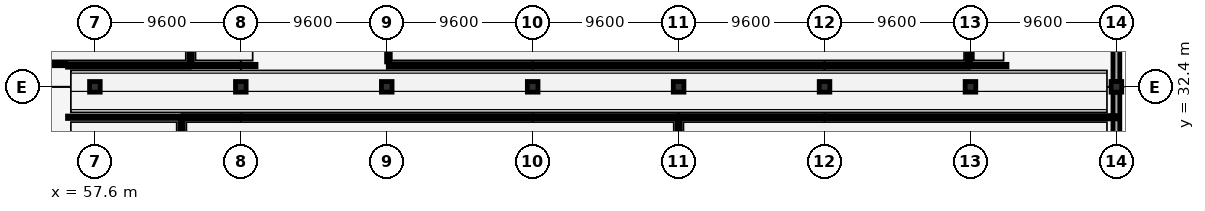
"""IFC4 building model, lengths in metres.
Left out: names, types, materials, properties, quantities, classifications, styles, units other than length and angle.
Written with IfcOpenShell. Run it as: python <this file> out.ifc"""

import sys

from ifc_helpers import new_model, si_unit, direction, frame, frame_2d, origin, origin_2d, place, context, subcontext, project, spatial, rectangle, extrude, element, fill, save


model = new_model("IFC4")
c1 = context("Model", 3, precision=1e-05, world=origin(), true_north=direction((0.0, 1.0)))
c2 = subcontext(c1, "Body", "Model", "MODEL_VIEW")
j1 = project(units=[si_unit("LENGTHUNIT", "METRE"), si_unit("PLANEANGLEUNIT", "RADIAN")], contexts=[c1])
p1 = place(None, origin())
s1 = spatial("IfcSite", under=j1, at=p1, CompositionType="ELEMENT")
p2 = place(p1, origin())
s2 = spatial("IfcBuilding", under=s1, at=p2, CompositionType="ELEMENT")
p3 = place(p2, frame((0.0, 0.0, -4.2)))
s3 = spatial("IfcBuildingStorey", under=s2, at=p3, CompositionType="ELEMENT", Elevation=-4.2)
for number, where, z_axis, x_axis in (
    (1, (57.6, 32.4, 0.0), (0.0, 0.0, 1.0), (1.0, 0.0, 0.0)),
    (2, (67.2, 32.4, 0.0), (0.0, 0.0, 1.0), (1.0, 0.0, 0.0)),
    (3, (76.8, 32.4, 0.0), (0.0, 0.0, 1.0), (1.0, 0.0, 0.0)),
    (4, (86.4, 32.4, 0.0), (0.0, 0.0, 1.0), (1.0, 0.0, 0.0)),
    (5, (96.0, 32.4, 0.0), (0.0, 0.0, 1.0), (1.0, 0.0, 0.0)),
    (6, (105.6, 32.4, 0.0), (0.0, 0.0, 1.0), (1.0, 0.0, 0.0)),
    (7, (115.2, 32.4, 0.0), (0.0, 0.0, 1.0), (1.0, 0.0, 0.0)),
    (8, (124.8, 32.4, 0.0), (0.0, 0.0, 1.0), (1.0, 0.0, 0.0)),
):
    element("IfcColumn", number, at=place(p3, frame(where, z_axis=z_axis, x_axis=x_axis)), inside=s3, PredefinedType="COLUMN", context=c2, shape_type="SweptSolid", body=[
        extrude(rectangle(XDim=0.7, YDim=0.7, at=origin_2d()), origin(), (0.0, 0.0, 1.0), 4.2),
    ])
for number, where, z_axis, x_axis in (
    (9, (124.8, 23.95, 0.0), (0.0, 0.0, 1.0), (0.0, 1.0, 0.0)),
    (10, (124.8, 32.75, 0.0), (0.0, 0.0, 1.0), (0.0, 1.0, 0.0)),
):
    element("IfcWall", number, at=place(p3, frame(where, z_axis=z_axis, x_axis=x_axis)), inside=s3, PredefinedType="SOLIDWALL", context=c2, shape_type="SweptSolid", body=[
        extrude(rectangle(XDim=8.1, YDim=0.45, at=frame_2d((4.05, 0.0))), origin(), (0.0, 0.0, 1.0), 3.84),
    ])
p4 = place(p3, frame((63.3, 18.155, 0.0), z_axis=(0.0, 0.0, 1.0), x_axis=(0.0, 1.0, 0.0)))
e11 = element("IfcWall", 11, at=p4, inside=s3, PredefinedType="PARTITIONING", context=c2, shape_type="SweptSolid", body=[
    extrude(rectangle(XDim=12.145, YDim=0.22, at=frame_2d((6.073, 0.0))), origin(), (0.0, 0.0, 1.0), 3.84),
])
p5 = place(p4, frame((5.323, 0.0, 0.0)))
e12 = element("IfcOpeningElement", 12, at=p5, cuts=e11, PredefinedType="OPENING", context=c2, shape_type="SweptSolid", body=[
    extrude(rectangle(XDim=1.5, YDim=2.2, at=frame_2d((0.75, 1.1))), frame((0.0, 0.12, 0.0), z_axis=(0.0, -1.0, 0.0), x_axis=(1.0, 0.0, 0.0)), (0.0, 0.0, 1.0), 0.24),
])
p6 = place(p3, frame((55.8, 30.4, 0.0), z_axis=(0.0, 0.0, 1.0), x_axis=(1.0, 0.0, 0.0)))
e13 = element("IfcWall", 13, at=p6, inside=s3, PredefinedType="PARTITIONING", context=c2, shape_type="SweptSolid", body=[
    extrude(rectangle(XDim=7.4, YDim=0.16, at=frame_2d((3.7, 0.0))), origin(), (0.0, 0.0, 1.0), 3.84),
])
p7 = place(p6, frame((3.044, 0.0, 0.0)))
e14 = element("IfcOpeningElement", 14, at=p7, cuts=e13, PredefinedType="OPENING", context=c2, shape_type="SweptSolid", body=[
    extrude(rectangle(XDim=1.8, YDim=2.15, at=frame_2d((0.9, 1.075))), frame((0.0, 0.09, 0.0), z_axis=(0.0, -1.0, 0.0), x_axis=(1.0, 0.0, 0.0)), (0.0, 0.0, 1.0), 0.18),
])
p8 = place(p3, frame((96.0, 11.4, 0.0), z_axis=(0.0, 0.0, 1.0), x_axis=(0.0, 1.0, 0.0)))
e15 = element("IfcWall", 15, at=p8, inside=s3, PredefinedType="PARTITIONING", context=c2, shape_type="SweptSolid", body=[
    extrude(rectangle(XDim=18.9, YDim=0.22, at=frame_2d((9.45, 0.0))), origin(), (0.0, 0.0, 1.0), 3.199),
])
p9 = place(p3, frame((63.4, 30.4, 0.0), z_axis=(0.0, 0.0, 1.0), x_axis=(1.0, 0.0, 0.0)))
e16 = element("IfcWall", 16, at=p9, inside=s3, PredefinedType="PARTITIONING", context=c2, shape_type="SweptSolid", body=[
    extrude(rectangle(XDim=32.55, YDim=0.22, at=frame_2d((16.275, 0.0))), origin(), (0.0, 0.0, 1.0), 3.84),
])
p10 = place(p9, frame((15.525, 0.0, 0.0)))
e17 = element("IfcOpeningElement", 17, at=p10, cuts=e16, PredefinedType="OPENING", context=c2, shape_type="SweptSolid", body=[
    extrude(rectangle(XDim=1.5, YDim=2.2, at=frame_2d((0.75, 1.1))), frame((0.0, 0.12, 0.0), z_axis=(0.0, -1.0, 0.0), x_axis=(1.0, 0.0, 0.0)), (0.0, 0.0, 1.0), 0.24),
])
p11 = place(p3, frame((96.03, 30.4, 0.0), z_axis=(0.0, 0.0, 1.0), x_axis=(1.0, 0.0, 0.0)))
e18 = element("IfcWall", 18, at=p11, inside=s3, PredefinedType="PARTITIONING", context=c2, shape_type="SweptSolid", body=[
    extrude(rectangle(XDim=28.72, YDim=0.22, at=frame_2d((14.36, 0.0))), origin(), (0.0, 0.0, 1.0), 3.84),
])
p12 = place(p11, frame((13.61, 0.0, 0.0)))
e19 = element("IfcOpeningElement", 19, at=p12, cuts=e18, PredefinedType="OPENING", context=c2, shape_type="SweptSolid", body=[
    extrude(rectangle(XDim=1.5, YDim=2.2, at=frame_2d((0.75, 1.1))), frame((0.0, 0.12, 0.0), z_axis=(0.0, -1.0, 0.0), x_axis=(1.0, 0.0, 0.0)), (0.0, 0.0, 1.0), 0.24),
])
p13 = place(p3, frame((115.15, 33.8, 0.0), z_axis=(0.0, 0.0, 1.0), x_axis=(1.0, 0.0, 0.0)))
e20 = element("IfcWall", 20, at=p13, inside=s3, PredefinedType="PARTITIONING", context=c2, shape_type="SweptSolid", body=[
    extrude(rectangle(XDim=2.45, YDim=0.16, at=frame_2d((1.225, 0.0))), origin(), (0.0, 0.0, 1.0), 3.84),
])
p14 = place(p13, frame((0.325, 0.0, 0.0)))
e21 = element("IfcOpeningElement", 21, at=p14, cuts=e20, PredefinedType="OPENING", context=c2, shape_type="SweptSolid", body=[
    extrude(rectangle(XDim=1.8, YDim=2.15, at=frame_2d((0.9, 1.075))), frame((0.0, 0.09, 0.0), z_axis=(0.0, -1.0, 0.0), x_axis=(1.0, 0.0, 0.0)), (0.0, 0.0, 1.0), 0.18),
])
p15 = place(p3, frame((64.0, 33.8, 0.0), z_axis=(0.0, 0.0, 1.0), x_axis=(1.0, 0.0, 0.0)))
e22 = element("IfcWall", 22, at=p15, inside=s3, PredefinedType="PARTITIONING", context=c2, shape_type="SweptSolid", body=[
    extrude(rectangle(XDim=4.2, YDim=0.16, at=frame_2d((2.1, 0.0))), origin(), (0.0, 0.0, 1.0), 3.84),
])
p16 = place(p15, frame((0.36, 0.0, 0.0)))
e23 = element("IfcOpeningElement", 23, at=p16, cuts=e22, PredefinedType="OPENING", context=c2, shape_type="SweptSolid", body=[
    extrude(rectangle(XDim=1.8, YDim=2.15, at=frame_2d((0.9, 1.075))), frame((0.0, 0.09, 0.0), z_axis=(0.0, -1.0, 0.0), x_axis=(1.0, 0.0, 0.0)), (0.0, 0.0, 1.0), 0.18),
])
p17 = place(p3, frame((55.8, 33.8, 0.0), z_axis=(0.0, 0.0, 1.0), x_axis=(1.0, 0.0, 0.0)))
e24 = element("IfcWall", 24, at=p17, inside=s3, PredefinedType="PARTITIONING", context=c2, shape_type="SweptSolid", body=[
    extrude(rectangle(XDim=8.0, YDim=0.22, at=frame_2d((4.0, 0.0))), origin(), (0.0, 0.0, 1.0), 3.84),
])
p18 = place(p17, frame((3.25, 0.0, 0.0)))
e25 = element("IfcOpeningElement", 25, at=p18, cuts=e24, PredefinedType="OPENING", context=c2, shape_type="SweptSolid", body=[
    extrude(rectangle(XDim=1.5, YDim=2.2, at=frame_2d((0.75, 1.1))), frame((0.0, 0.12, 0.0), z_axis=(0.0, -1.0, 0.0), x_axis=(1.0, 0.0, 0.0)), (0.0, 0.0, 1.0), 0.24),
])
p19 = place(p3, frame((76.9, 33.8, 0.0), z_axis=(0.0, 0.0, 1.0), x_axis=(1.0, 0.0, 0.0)))
e26 = element("IfcWall", 26, at=p19, inside=s3, PredefinedType="PARTITIONING", context=c2, shape_type="SweptSolid", body=[
    extrude(rectangle(XDim=38.17, YDim=0.22, at=frame_2d((19.085, 0.0))), origin(), (0.0, 0.0, 1.0), 3.84),
])
p20 = place(p19, frame((14.74, 0.0, 0.0)))
e27 = element("IfcOpeningElement", 27, at=p20, cuts=e26, PredefinedType="OPENING", context=c2, shape_type="SweptSolid", body=[
    extrude(rectangle(XDim=1.5, YDim=2.2, at=frame_2d((0.75, 1.1))), frame((0.0, 0.12, 0.0), z_axis=(0.0, -1.0, 0.0), x_axis=(1.0, 0.0, 0.0)), (0.0, 0.0, 1.0), 0.24),
])
p21 = place(p3, frame((115.1, 33.9, 0.0), z_axis=(0.0, 0.0, 1.0), x_axis=(0.0, 1.0, 0.0)))
e28 = element("IfcWall", 28, at=p21, inside=s3, PredefinedType="PARTITIONING", context=c2, shape_type="SweptSolid", body=[
    extrude(rectangle(XDim=24.85, YDim=0.22, at=frame_2d((12.425, 0.0))), origin(), (0.0, 0.0, 1.0), 3.199),
])
p22 = place(p21, frame((11.675, 0.0, 0.0)))
e29 = element("IfcOpeningElement", 29, at=p22, cuts=e28, PredefinedType="OPENING", context=c2, shape_type="SweptSolid", body=[
    extrude(rectangle(XDim=1.5, YDim=2.2, at=frame_2d((0.75, 1.1))), frame((0.0, 0.12, 0.0), z_axis=(0.0, -1.0, 0.0), x_axis=(1.0, 0.0, 0.0)), (0.0, 0.0, 1.0), 0.24),
])
p23 = place(p3, frame((63.9, 33.9, 0.0), z_axis=(0.0, 0.0, 1.0), x_axis=(0.0, 1.0, 0.0)))
e30 = element("IfcWall", 30, at=p23, inside=s3, PredefinedType="PARTITIONING", context=c2, shape_type="SweptSolid", body=[
    extrude(rectangle(XDim=24.85, YDim=0.22, at=frame_2d((12.425, 0.0))), origin(), (0.0, 0.0, 1.0), 3.84),
])
p24 = place(p23, frame((11.675, 0.0, 0.0)))
e31 = element("IfcOpeningElement", 31, at=p24, cuts=e30, PredefinedType="OPENING", context=c2, shape_type="SweptSolid", body=[
    extrude(rectangle(XDim=1.5, YDim=2.2, at=frame_2d((0.75, 1.1))), frame((0.0, 0.12, 0.0), z_axis=(0.0, -1.0, 0.0), x_axis=(1.0, 0.0, 0.0)), (0.0, 0.0, 1.0), 0.24),
])
p25 = place(p3, frame((48.05, 33.9, 0.0), z_axis=(0.0, 0.0, 1.0), x_axis=(1.0, 0.0, 0.0)))
e32 = element("IfcWall", 32, at=p25, inside=s3, PredefinedType="PARTITIONING", context=c2, shape_type="SweptSolid", body=[
    extrude(rectangle(XDim=7.61, YDim=0.22, at=frame_2d((3.805, 0.0))), origin(), (0.0, 0.0, 1.0), 3.84),
])
p26 = place(p3, frame((76.9, 34.04, 0.0), z_axis=(0.0, 0.0, 1.0), x_axis=(0.0, 1.0, 0.0)))
e33 = element("IfcWall", 33, at=p26, inside=s3, PredefinedType="PARTITIONING", context=c2, shape_type="SweptSolid", body=[
    extrude(rectangle(XDim=24.71, YDim=0.22, at=frame_2d((12.355, 0.0))), origin(), (0.0, 0.0, 1.0), 3.199),
])
p27 = place(p7, origin())
e34 = element("IfcDoor", 34, at=p27, inside=s3, OperationType="DOUBLE_DOOR_SINGLE_SWING", PredefinedType="DOOR", context=c2, shape_type="SweptSolid", body=[
    extrude(rectangle(XDim=1.8, YDim=2.15, at=frame_2d((0.9, 1.075))), frame((0.0, 0.025, 0.0), z_axis=(0.0, -1.0, 0.0), x_axis=(1.0, 0.0, 0.0)), (0.0, 0.0, 1.0), 0.05),
])
fill(e14, e34)
p28 = place(p10, origin())
e35 = element("IfcDoor", 35, at=p28, inside=s3, OperationType="SLIDING_TO_RIGHT", PredefinedType="DOOR", context=c2, shape_type="SweptSolid", body=[
    extrude(rectangle(XDim=1.5, YDim=2.2, at=frame_2d((0.75, 1.1))), frame((0.0, 0.025, 0.0), z_axis=(0.0, -1.0, 0.0), x_axis=(1.0, 0.0, 0.0)), (0.0, 0.0, 1.0), 0.05),
])
fill(e17, e35)
p29 = place(p12, origin())
e36 = element("IfcDoor", 36, at=p29, inside=s3, OperationType="SLIDING_TO_RIGHT", PredefinedType="DOOR", context=c2, shape_type="SweptSolid", body=[
    extrude(rectangle(XDim=1.5, YDim=2.2, at=frame_2d((0.75, 1.1))), frame((0.0, 0.025, 0.0), z_axis=(0.0, -1.0, 0.0), x_axis=(1.0, 0.0, 0.0)), (0.0, 0.0, 1.0), 0.05),
])
fill(e19, e36)
p30 = place(p14, origin())
e37 = element("IfcDoor", 37, at=p30, inside=s3, OperationType="DOUBLE_DOOR_SINGLE_SWING", PredefinedType="DOOR", context=c2, shape_type="SweptSolid", body=[
    extrude(rectangle(XDim=1.8, YDim=2.15, at=frame_2d((0.9, 1.075))), frame((0.0, 0.025, 0.0), z_axis=(0.0, -1.0, 0.0), x_axis=(1.0, 0.0, 0.0)), (0.0, 0.0, 1.0), 0.05),
])
fill(e21, e37)
p31 = place(p16, origin())
e38 = element("IfcDoor", 38, at=p31, inside=s3, OperationType="DOUBLE_DOOR_SINGLE_SWING", PredefinedType="DOOR", context=c2, shape_type="SweptSolid", body=[
    extrude(rectangle(XDim=1.8, YDim=2.15, at=frame_2d((0.9, 1.075))), frame((0.0, 0.025, 0.0), z_axis=(0.0, -1.0, 0.0), x_axis=(1.0, 0.0, 0.0)), (0.0, 0.0, 1.0), 0.05),
])
fill(e23, e38)
p32 = place(p18, origin())
e39 = element("IfcDoor", 39, at=p32, inside=s3, OperationType="SLIDING_TO_RIGHT", PredefinedType="DOOR", context=c2, shape_type="SweptSolid", body=[
    extrude(rectangle(XDim=1.5, YDim=2.2, at=frame_2d((0.75, 1.1))), frame((0.0, 0.025, 0.0), z_axis=(0.0, -1.0, 0.0), x_axis=(1.0, 0.0, 0.0)), (0.0, 0.0, 1.0), 0.05),
])
fill(e25, e39)
p33 = place(p20, origin())
e40 = element("IfcDoor", 40, at=p33, inside=s3, OperationType="SLIDING_TO_RIGHT", PredefinedType="DOOR", context=c2, shape_type="SweptSolid", body=[
    extrude(rectangle(XDim=1.5, YDim=2.2, at=frame_2d((0.75, 1.1))), frame((0.0, 0.025, 0.0), z_axis=(0.0, -1.0, 0.0), x_axis=(1.0, 0.0, 0.0)), (0.0, 0.0, 1.0), 0.05),
])
fill(e27, e40)
save(model, sys.argv[1])
